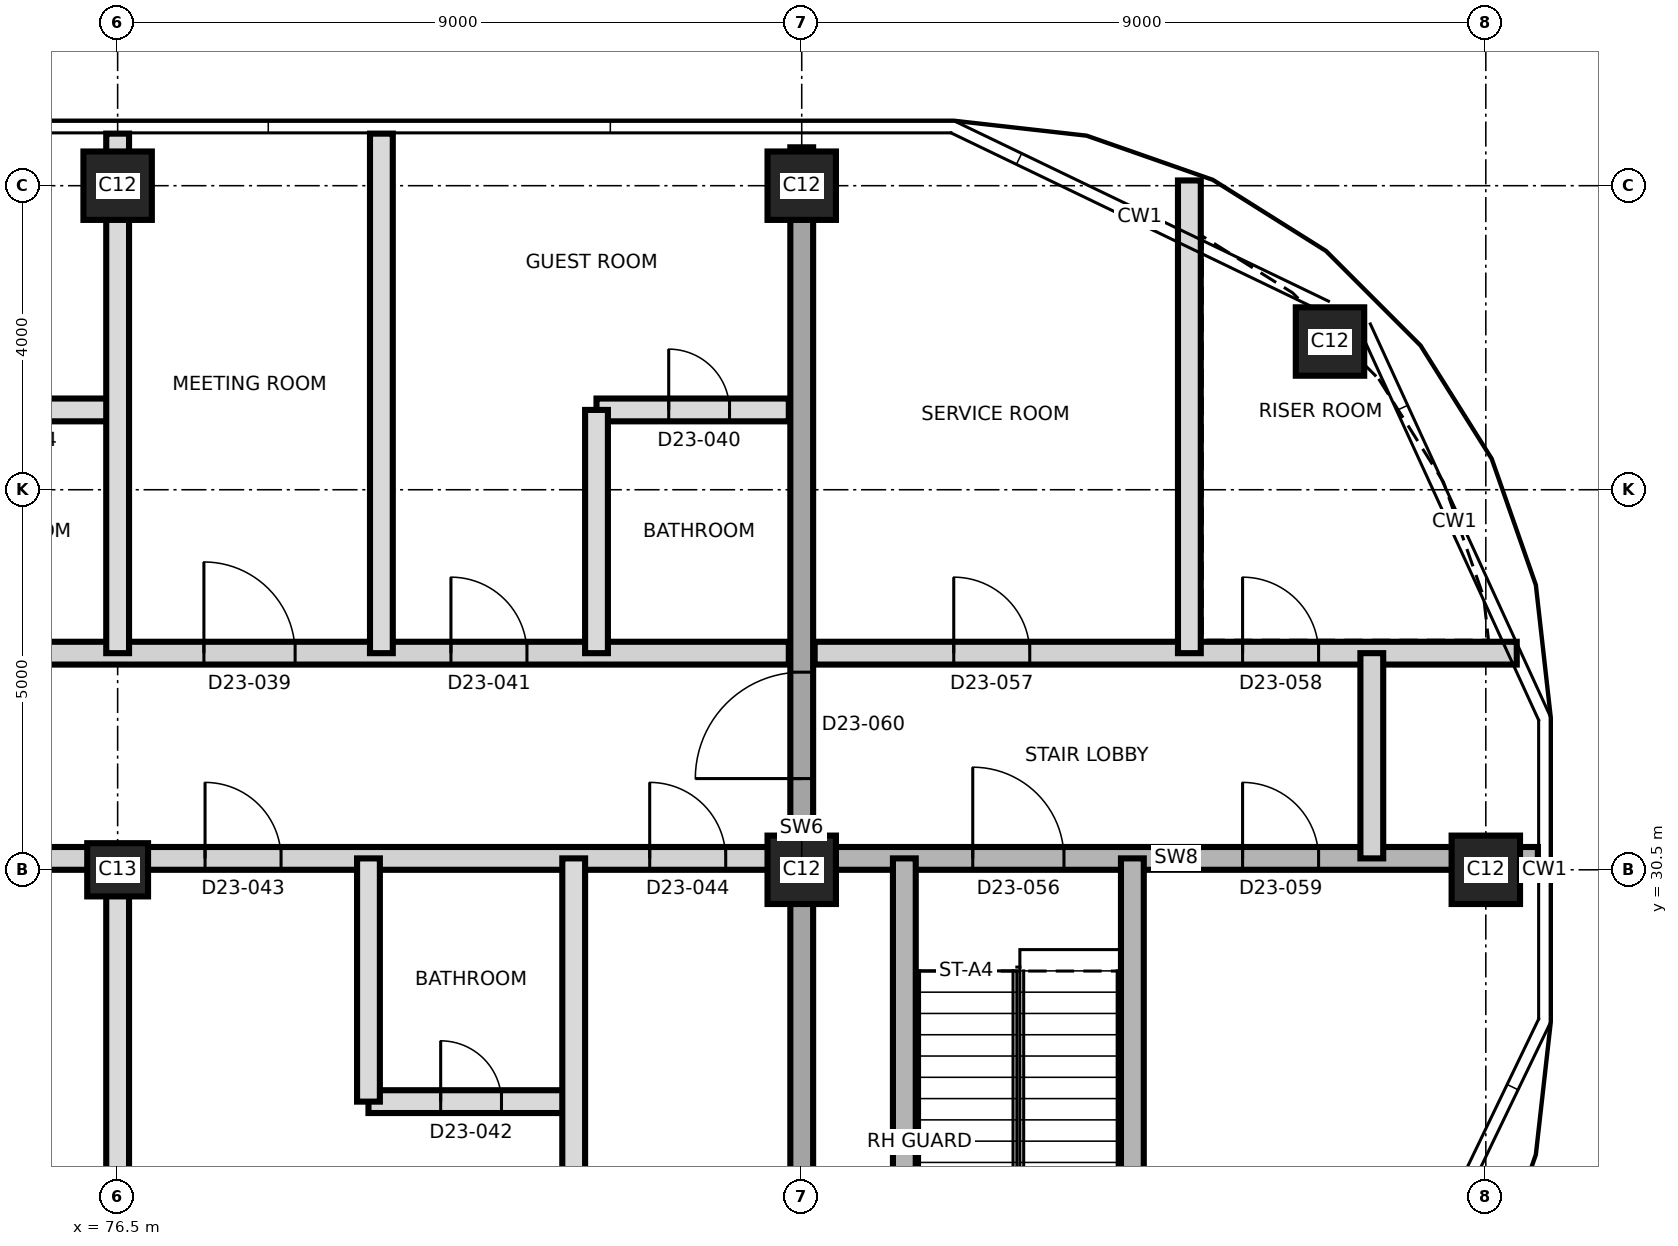
"""IFC4 building model, lengths in metres.
Left out: names, types, materials, properties, quantities, classifications, styles, units other than length and angle.
Written with IfcOpenShell. Run it as: python <this file> out.ifc"""

import sys

from ifc_helpers import new_model, si_unit, direction, frame, frame_2d, origin, origin_2d, place, context, subcontext, project, spatial, rectangle, extrude, element, fill, save


model = new_model("IFC4")
c1 = context("Model", 3, precision=1e-05, world=origin(), true_north=direction((0.0, 1.0)))
c2 = subcontext(c1, "Body", "Model", "MODEL_VIEW")
j1 = project(units=[si_unit("LENGTHUNIT", "METRE"), si_unit("PLANEANGLEUNIT", "RADIAN")], contexts=[c1])
p1 = place(None, origin())
s1 = spatial("IfcSite", under=j1, at=p1, CompositionType="ELEMENT")
p2 = place(p1, origin())
s2 = spatial("IfcBuilding", under=s1, at=p2, CompositionType="ELEMENT")
p3 = place(p2, frame((0.0, 0.0, 210.6)))
s3 = spatial("IfcBuildingStorey", under=s2, at=p3, CompositionType="ELEMENT", Elevation=210.6)
p4 = place(p3, frame((76.5, 30.5, 0.0), z_axis=(0.0, 0.0, 1.0), x_axis=(1.0, 0.0, 0.0)))
e1 = element("IfcColumn", 1, at=p4, inside=s3, PredefinedType="COLUMN", context=c2, shape_type="SweptSolid", body=[
    extrude(rectangle(XDim=0.8, YDim=0.7, at=origin_2d()), origin(), (0.0, 0.0, 1.0), 3.7),
])
for number, where, z_axis, x_axis in (
    (2, (85.5, 30.5, 0.0), (0.0, 0.0, 1.0), (1.0, 0.0, 0.0)),
    (3, (94.5, 30.5, 0.0), (0.0, 0.0, 1.0), (1.0, 0.0, 0.0)),
    (4, (92.45, 37.45, 0.0), (0.0, 0.0, 1.0), (1.0, 0.0, 0.0)),
    (5, (76.5, 39.5, 0.0), (0.0, 0.0, 1.0), (1.0, 0.0, 0.0)),
    (6, (85.5, 39.5, 0.0), (0.0, 0.0, 1.0), (1.0, 0.0, 0.0)),
):
    element("IfcColumn", number, at=place(p3, frame(where, z_axis=z_axis, x_axis=x_axis)), inside=s3, PredefinedType="COLUMN", context=c2, shape_type="SweptSolid", body=[
        extrude(rectangle(XDim=0.9, YDim=0.9, at=origin_2d()), origin(), (0.0, 0.0, 1.0), 3.7),
    ])
p5 = place(p3, frame((85.5, 20.995, 0.0), z_axis=(0.0, 0.0, 1.0), x_axis=(0.0, 1.0, 0.0)))
e7 = element("IfcWall", 7, at=p5, inside=s3, PredefinedType="SHEAR", context=c2, shape_type="SweptSolid", body=[
    extrude(rectangle(XDim=19.01, YDim=0.3, at=frame_2d((9.505, 0.0))), origin(), (0.0, 0.0, 1.0), 3.7),
])
p6 = place(p5, frame((10.705, 0.0, 0.0)))
e8 = element("IfcOpeningElement", 8, at=p6, cuts=e7, PredefinedType="OPENING", context=c2, shape_type="SweptSolid", body=[
    extrude(rectangle(XDim=1.4, YDim=2.1, at=frame_2d((0.7, 1.05))), frame((0.0, 0.16, 0.0), z_axis=(0.0, -1.0, 0.0), x_axis=(1.0, 0.0, 0.0)), (0.0, 0.0, 1.0), 0.32),
])
p7 = place(p3, frame((79.8, 27.45, 0.0), z_axis=(0.0, 0.0, 1.0), x_axis=(1.0, 0.0, 0.0)))
e9 = element("IfcWall", 9, at=p7, inside=s3, PredefinedType="PARTITIONING", context=c2, shape_type="SweptSolid", body=[
    extrude(rectangle(XDim=2.7, YDim=0.3, at=frame_2d((1.35, 0.0))), origin(), (0.0, 0.0, 1.0), 3.4),
])
p8 = place(p7, frame((0.95, 0.0, 0.0)))
e10 = element("IfcOpeningElement", 10, at=p8, cuts=e9, PredefinedType="OPENING", context=c2, shape_type="SweptSolid", body=[
    extrude(rectangle(XDim=0.8, YDim=2.1, at=frame_2d((0.4, 1.05))), frame((0.0, 0.16, 0.0), z_axis=(0.0, -1.0, 0.0), x_axis=(1.0, 0.0, 0.0)), (0.0, 0.0, 1.0), 0.32),
])
p9 = place(p3, frame((58.55, 30.65, 0.0), z_axis=(0.0, 0.0, 1.0), x_axis=(1.0, 0.0, 0.0)))
e11 = element("IfcWall", 11, at=p9, inside=s3, PredefinedType="PARTITIONING", context=c2, shape_type="SweptSolid", body=[
    extrude(rectangle(XDim=26.78, YDim=0.3, at=frame_2d((13.39, 0.0))), origin(), (0.0, 0.0, 1.0), 3.4),
])
p10 = place(p9, frame((3.365, 0.0, 0.0)))
e12 = element("IfcOpeningElement", 12, at=p10, cuts=e11, PredefinedType="OPENING", context=c2, shape_type="SweptSolid", body=[
    extrude(rectangle(XDim=1.0, YDim=2.1, at=frame_2d((0.5, 1.05))), frame((0.0, 0.16, 0.0), z_axis=(0.0, -1.0, 0.0), x_axis=(1.0, 0.0, 0.0)), (0.0, 0.0, 1.0), 0.32),
])
p11 = place(p9, frame((6.315, 0.0, 0.0)))
e13 = element("IfcOpeningElement", 13, at=p11, cuts=e11, PredefinedType="OPENING", context=c2, shape_type="SweptSolid", body=[
    extrude(rectangle(XDim=1.4, YDim=2.1, at=frame_2d((0.7, 1.05))), frame((0.0, 0.16, 0.0), z_axis=(0.0, -1.0, 0.0), x_axis=(1.0, 0.0, 0.0)), (0.0, 0.0, 1.0), 0.32),
])
p12 = place(p9, frame((10.1, 0.0, 0.0)))
e14 = element("IfcOpeningElement", 14, at=p12, cuts=e11, PredefinedType="OPENING", context=c2, shape_type="SweptSolid", body=[
    extrude(rectangle(XDim=1.0, YDim=2.1, at=frame_2d((0.5, 1.05))), frame((0.0, 0.16, 0.0), z_axis=(0.0, -1.0, 0.0), x_axis=(1.0, 0.0, 0.0)), (0.0, 0.0, 1.0), 0.32),
])
p13 = place(p9, frame((15.95, 0.0, 0.0)))
e15 = element("IfcOpeningElement", 15, at=p13, cuts=e11, PredefinedType="OPENING", context=c2, shape_type="SweptSolid", body=[
    extrude(rectangle(XDim=1.0, YDim=2.1, at=frame_2d((0.5, 1.05))), frame((0.0, 0.16, 0.0), z_axis=(0.0, -1.0, 0.0), x_axis=(1.0, 0.0, 0.0)), (0.0, 0.0, 1.0), 0.32),
])
p14 = place(p9, frame((19.1, 0.0, 0.0)))
e16 = element("IfcOpeningElement", 16, at=p14, cuts=e11, PredefinedType="OPENING", context=c2, shape_type="SweptSolid", body=[
    extrude(rectangle(XDim=1.0, YDim=2.1, at=frame_2d((0.5, 1.05))), frame((0.0, 0.16, 0.0), z_axis=(0.0, -1.0, 0.0), x_axis=(1.0, 0.0, 0.0)), (0.0, 0.0, 1.0), 0.32),
])
p15 = place(p9, frame((24.95, 0.0, 0.0)))
e17 = element("IfcOpeningElement", 17, at=p15, cuts=e11, PredefinedType="OPENING", context=c2, shape_type="SweptSolid", body=[
    extrude(rectangle(XDim=1.0, YDim=2.1, at=frame_2d((0.5, 1.05))), frame((0.0, 0.16, 0.0), z_axis=(0.0, -1.0, 0.0), x_axis=(1.0, 0.0, 0.0)), (0.0, 0.0, 1.0), 0.32),
])
p16 = place(p3, frame((85.67, 30.65, 0.0), z_axis=(0.0, 0.0, 1.0), x_axis=(1.0, 0.0, 0.0)))
e18 = element("IfcWall", 18, at=p16, inside=s3, PredefinedType="SHEAR", context=c2, shape_type="SweptSolid", body=[
    extrude(rectangle(XDim=9.515, YDim=0.3, at=frame_2d((4.758, 0.0))), origin(), (0.0, 0.0, 1.0), 3.4),
])
p17 = place(p16, frame((2.08, 0.0, 0.0)))
e19 = element("IfcOpeningElement", 19, at=p17, cuts=e18, PredefinedType="OPENING", context=c2, shape_type="SweptSolid", body=[
    extrude(rectangle(XDim=1.2, YDim=2.1, at=frame_2d((0.6, 1.05))), frame((0.0, 0.16, 0.0), z_axis=(0.0, -1.0, 0.0), x_axis=(1.0, 0.0, 0.0)), (0.0, 0.0, 1.0), 0.32),
])
p18 = place(p16, frame((5.63, 0.0, 0.0)))
e20 = element("IfcOpeningElement", 20, at=p18, cuts=e18, PredefinedType="OPENING", context=c2, shape_type="SweptSolid", body=[
    extrude(rectangle(XDim=1.0, YDim=2.1, at=frame_2d((0.5, 1.05))), frame((0.0, 0.16, 0.0), z_axis=(0.0, -1.0, 0.0), x_axis=(1.0, 0.0, 0.0)), (0.0, 0.0, 1.0), 0.32),
])
p19 = place(p3, frame((58.55, 33.35, 0.0), z_axis=(0.0, 0.0, 1.0), x_axis=(1.0, 0.0, 0.0)))
e21 = element("IfcWall", 21, at=p19, inside=s3, PredefinedType="PARTITIONING", context=c2, shape_type="SweptSolid", body=[
    extrude(rectangle(XDim=26.78, YDim=0.3, at=frame_2d((13.39, 0.0))), origin(), (0.0, 0.0, 1.0), 3.4),
])
p20 = place(p19, frame((3.365, 0.0, 0.0)))
e22 = element("IfcOpeningElement", 22, at=p20, cuts=e21, PredefinedType="OPENING", context=c2, shape_type="SweptSolid", body=[
    extrude(rectangle(XDim=1.0, YDim=2.1, at=frame_2d((0.5, 1.05))), frame((0.0, 0.16, 0.0), z_axis=(0.0, -1.0, 0.0), x_axis=(1.0, 0.0, 0.0)), (0.0, 0.0, 1.0), 0.32),
])
p21 = place(p19, frame((6.315, 0.0, 0.0)))
e23 = element("IfcOpeningElement", 23, at=p21, cuts=e21, PredefinedType="OPENING", context=c2, shape_type="SweptSolid", body=[
    extrude(rectangle(XDim=1.4, YDim=2.1, at=frame_2d((0.7, 1.05))), frame((0.0, 0.16, 0.0), z_axis=(0.0, -1.0, 0.0), x_axis=(1.0, 0.0, 0.0)), (0.0, 0.0, 1.0), 0.32),
])
p22 = place(p19, frame((10.65, 0.0, 0.0)))
e24 = element("IfcOpeningElement", 24, at=p22, cuts=e21, PredefinedType="OPENING", context=c2, shape_type="SweptSolid", body=[
    extrude(rectangle(XDim=1.2, YDim=2.1, at=frame_2d((0.6, 1.05))), frame((0.0, 0.16, 0.0), z_axis=(0.0, -1.0, 0.0), x_axis=(1.0, 0.0, 0.0)), (0.0, 0.0, 1.0), 0.32),
])
p23 = place(p19, frame((13.9, 0.0, 0.0)))
e25 = element("IfcOpeningElement", 25, at=p23, cuts=e21, PredefinedType="OPENING", context=c2, shape_type="SweptSolid", body=[
    extrude(rectangle(XDim=1.0, YDim=2.1, at=frame_2d((0.5, 1.05))), frame((0.0, 0.16, 0.0), z_axis=(0.0, -1.0, 0.0), x_axis=(1.0, 0.0, 0.0)), (0.0, 0.0, 1.0), 0.32),
])
p24 = place(p19, frame((19.085, 0.0, 0.0)))
e26 = element("IfcOpeningElement", 26, at=p24, cuts=e21, PredefinedType="OPENING", context=c2, shape_type="SweptSolid", body=[
    extrude(rectangle(XDim=1.2, YDim=2.1, at=frame_2d((0.6, 1.05))), frame((0.0, 0.16, 0.0), z_axis=(0.0, -1.0, 0.0), x_axis=(1.0, 0.0, 0.0)), (0.0, 0.0, 1.0), 0.32),
])
p25 = place(p19, frame((22.335, 0.0, 0.0)))
e27 = element("IfcOpeningElement", 27, at=p25, cuts=e21, PredefinedType="OPENING", context=c2, shape_type="SweptSolid", body=[
    extrude(rectangle(XDim=1.0, YDim=2.1, at=frame_2d((0.5, 1.05))), frame((0.0, 0.16, 0.0), z_axis=(0.0, -1.0, 0.0), x_axis=(1.0, 0.0, 0.0)), (0.0, 0.0, 1.0), 0.32),
])
p26 = place(p3, frame((85.67, 33.35, 0.0), z_axis=(0.0, 0.0, 1.0), x_axis=(1.0, 0.0, 0.0)))
e28 = element("IfcWall", 28, at=p26, inside=s3, PredefinedType="PARTITIONING", context=c2, shape_type="SweptSolid", body=[
    extrude(rectangle(XDim=9.237, YDim=0.3, at=frame_2d((4.619, 0.0))), origin(), (0.0, 0.0, 1.0), 3.35),
])
p27 = place(p26, frame((1.83, 0.0, 0.0)))
e29 = element("IfcOpeningElement", 29, at=p27, cuts=e28, PredefinedType="OPENING", context=c2, shape_type="SweptSolid", body=[
    extrude(rectangle(XDim=1.0, YDim=2.1, at=frame_2d((0.5, 1.05))), frame((0.0, 0.16, 0.0), z_axis=(0.0, -1.0, 0.0), x_axis=(1.0, 0.0, 0.0)), (0.0, 0.0, 1.0), 0.32),
])
p28 = place(p26, frame((5.63, 0.0, 0.0)))
e30 = element("IfcOpeningElement", 30, at=p28, cuts=e28, PredefinedType="OPENING", context=c2, shape_type="SweptSolid", body=[
    extrude(rectangle(XDim=1.0, YDim=2.1, at=frame_2d((0.5, 1.05))), frame((0.0, 0.16, 0.0), z_axis=(0.0, -1.0, 0.0), x_axis=(1.0, 0.0, 0.0)), (0.0, 0.0, 1.0), 0.32),
])
p29 = place(p3, frame((73.8, 36.55, 0.0), z_axis=(0.0, 0.0, 1.0), x_axis=(1.0, 0.0, 0.0)))
e31 = element("IfcWall", 31, at=p29, inside=s3, PredefinedType="PARTITIONING", context=c2, shape_type="SweptSolid", body=[
    extrude(rectangle(XDim=2.7, YDim=0.3, at=frame_2d((1.35, 0.0))), origin(), (0.0, 0.0, 1.0), 3.4),
])
p30 = place(p29, frame((0.95, 0.0, 0.0)))
e32 = element("IfcOpeningElement", 32, at=p30, cuts=e31, PredefinedType="OPENING", context=c2, shape_type="SweptSolid", body=[
    extrude(rectangle(XDim=0.8, YDim=2.1, at=frame_2d((0.4, 1.05))), frame((0.0, 0.16, 0.0), z_axis=(0.0, -1.0, 0.0), x_axis=(1.0, 0.0, 0.0)), (0.0, 0.0, 1.0), 0.32),
])
p31 = place(p3, frame((82.8, 36.55, 0.0), z_axis=(0.0, 0.0, 1.0), x_axis=(1.0, 0.0, 0.0)))
e33 = element("IfcWall", 33, at=p31, inside=s3, PredefinedType="PARTITIONING", context=c2, shape_type="SweptSolid", body=[
    extrude(rectangle(XDim=2.53, YDim=0.3, at=frame_2d((1.265, 0.0))), origin(), (0.0, 0.0, 1.0), 3.4),
])
p32 = place(p31, frame((0.95, 0.0, 0.0)))
e34 = element("IfcOpeningElement", 34, at=p32, cuts=e33, PredefinedType="OPENING", context=c2, shape_type="SweptSolid", body=[
    extrude(rectangle(XDim=0.8, YDim=2.1, at=frame_2d((0.4, 1.05))), frame((0.0, 0.16, 0.0), z_axis=(0.0, -1.0, 0.0), x_axis=(1.0, 0.0, 0.0)), (0.0, 0.0, 1.0), 0.32),
])
p33 = place(p3, frame((76.5, 20.995, 0.0), z_axis=(0.0, 0.0, 1.0), x_axis=(0.0, 1.0, 0.0)))
e35 = element("IfcWall", 35, at=p33, inside=s3, PredefinedType="PARTITIONING", context=c2, shape_type="SweptSolid", body=[
    extrude(rectangle(XDim=9.655, YDim=0.3, at=frame_2d((4.827, 0.0))), origin(), (0.0, 0.0, 1.0), 3.35),
])
p34 = place(p3, frame((76.5, 33.35, 0.0), z_axis=(0.0, 0.0, 1.0), x_axis=(0.0, 1.0, 0.0)))
e36 = element("IfcWall", 36, at=p34, inside=s3, PredefinedType="PARTITIONING", context=c2, shape_type="SweptSolid", body=[
    extrude(rectangle(XDim=6.835, YDim=0.3, at=frame_2d((3.417, 0.0))), origin(), (0.0, 0.0, 1.0), 3.35),
])
p35 = place(p3, frame((79.8, 27.45, 0.0), z_axis=(0.0, 0.0, 1.0), x_axis=(0.0, 1.0, 0.0)))
e37 = element("IfcWall", 37, at=p35, inside=s3, PredefinedType="PARTITIONING", context=c2, shape_type="SweptSolid", body=[
    extrude(rectangle(XDim=3.2, YDim=0.3, at=frame_2d((1.6, 0.0))), origin(), (0.0, 0.0, 1.0), 3.4),
])
p36 = place(p3, frame((79.97, 33.35, 0.0), z_axis=(0.0, 0.0, 1.0), x_axis=(0.0, 1.0, 0.0)))
e38 = element("IfcWall", 38, at=p36, inside=s3, PredefinedType="PARTITIONING", context=c2, shape_type="SweptSolid", body=[
    extrude(rectangle(XDim=6.835, YDim=0.3, at=frame_2d((3.417, 0.0))), origin(), (0.0, 0.0, 1.0), 3.35),
])
p37 = place(p3, frame((82.5, 20.995, 0.0), z_axis=(0.0, 0.0, 1.0), x_axis=(0.0, 1.0, 0.0)))
e39 = element("IfcWall", 39, at=p37, inside=s3, PredefinedType="PARTITIONING", context=c2, shape_type="SweptSolid", body=[
    extrude(rectangle(XDim=9.655, YDim=0.3, at=frame_2d((4.827, 0.0))), origin(), (0.0, 0.0, 1.0), 3.35),
])
p38 = place(p3, frame((82.8, 33.35, 0.0), z_axis=(0.0, 0.0, 1.0), x_axis=(0.0, 1.0, 0.0)))
e40 = element("IfcWall", 40, at=p38, inside=s3, PredefinedType="PARTITIONING", context=c2, shape_type="SweptSolid", body=[
    extrude(rectangle(XDim=3.2, YDim=0.3, at=frame_2d((1.6, 0.0))), origin(), (0.0, 0.0, 1.0), 3.4),
])
for number, where, z_axis, x_axis in (
    (41, (86.85, 21.8, 0.0), (0.0, 0.0, 1.0), (0.0, 1.0, 0.0)),
    (42, (89.85, 21.8, 0.0), (0.0, 0.0, 1.0), (0.0, 1.0, 0.0)),
):
    element("IfcWall", number, at=place(p3, frame(where, z_axis=z_axis, x_axis=x_axis)), inside=s3, PredefinedType="SHEAR", context=c2, shape_type="SweptSolid", body=[
        extrude(rectangle(XDim=8.85, YDim=0.3, at=frame_2d((4.425, 0.0))), origin(), (0.0, 0.0, 1.0), 3.4),
    ])
p39 = place(p3, frame((90.6, 33.35, 0.0), z_axis=(0.0, 0.0, 1.0), x_axis=(0.0, 1.0, 0.0)))
e43 = element("IfcWall", 43, at=p39, inside=s3, PredefinedType="PARTITIONING", context=c2, shape_type="SweptSolid", body=[
    extrude(rectangle(XDim=6.219, YDim=0.3, at=frame_2d((3.109, 0.0))), origin(), (0.0, 0.0, 1.0), 3.35),
])
p40 = place(p3, frame((93.0, 30.65, 0.0), z_axis=(0.0, 0.0, 1.0), x_axis=(0.0, 1.0, 0.0)))
e44 = element("IfcWall", 44, at=p40, inside=s3, PredefinedType="PARTITIONING", context=c2, shape_type="SweptSolid", body=[
    extrude(rectangle(XDim=2.7, YDim=0.3, at=frame_2d((1.35, 0.0))), origin(), (0.0, 0.0, 1.0), 3.4),
])
p41 = place(p24, origin())
e45 = element("IfcDoor", 45, at=p41, inside=s3, OperationType="SINGLE_SWING_LEFT", PredefinedType="DOOR", context=c2, shape_type="SweptSolid", body=[
    extrude(rectangle(XDim=1.2, YDim=2.1, at=frame_2d((0.6, 1.05))), frame((0.0, 0.025, 0.0), z_axis=(0.0, -1.0, 0.0), x_axis=(1.0, 0.0, 0.0)), (0.0, 0.0, 1.0), 0.05),
])
fill(e26, e45)
p42 = place(p32, origin())
e46 = element("IfcDoor", 46, at=p42, inside=s3, OperationType="SINGLE_SWING_RIGHT", PredefinedType="DOOR", context=c2, shape_type="SweptSolid", body=[
    extrude(rectangle(XDim=0.8, YDim=2.1, at=frame_2d((0.4, 1.05))), frame((0.0, 0.025, 0.0), z_axis=(0.0, -1.0, 0.0), x_axis=(1.0, 0.0, 0.0)), (0.0, 0.0, 1.0), 0.05),
])
fill(e34, e46)
p43 = place(p25, origin())
e47 = element("IfcDoor", 47, at=p43, inside=s3, OperationType="SINGLE_SWING_LEFT", PredefinedType="DOOR", context=c2, shape_type="SweptSolid", body=[
    extrude(rectangle(XDim=1.0, YDim=2.1, at=frame_2d((0.5, 1.05))), frame((0.0, 0.025, 0.0), z_axis=(0.0, -1.0, 0.0), x_axis=(1.0, 0.0, 0.0)), (0.0, 0.0, 1.0), 0.05),
])
fill(e27, e47)
p44 = place(p8, origin())
e48 = element("IfcDoor", 48, at=p44, inside=s3, OperationType="SINGLE_SWING_LEFT", PredefinedType="DOOR", context=c2, shape_type="SweptSolid", body=[
    extrude(rectangle(XDim=0.8, YDim=2.1, at=frame_2d((0.4, 1.05))), frame((0.0, 0.025, 0.0), z_axis=(0.0, -1.0, 0.0), x_axis=(1.0, 0.0, 0.0)), (0.0, 0.0, 1.0), 0.05),
])
fill(e10, e48)
p45 = place(p14, origin())
e49 = element("IfcDoor", 49, at=p45, inside=s3, OperationType="SINGLE_SWING_LEFT", PredefinedType="DOOR", context=c2, shape_type="SweptSolid", body=[
    extrude(rectangle(XDim=1.0, YDim=2.1, at=frame_2d((0.5, 1.05))), frame((0.0, 0.025, 0.0), z_axis=(0.0, -1.0, 0.0), x_axis=(1.0, 0.0, 0.0)), (0.0, 0.0, 1.0), 0.05),
])
fill(e16, e49)
p46 = place(p15, origin())
e50 = element("IfcDoor", 50, at=p46, inside=s3, OperationType="SINGLE_SWING_RIGHT", PredefinedType="DOOR", context=c2, shape_type="SweptSolid", body=[
    extrude(rectangle(XDim=1.0, YDim=2.1, at=frame_2d((0.5, 1.05))), frame((0.0, 0.025, 0.0), z_axis=(0.0, -1.0, 0.0), x_axis=(1.0, 0.0, 0.0)), (0.0, 0.0, 1.0), 0.05),
])
fill(e17, e50)
p47 = place(p17, origin())
e51 = element("IfcDoor", 51, at=p47, inside=s3, OperationType="SINGLE_SWING_LEFT", PredefinedType="DOOR", context=c2, shape_type="SweptSolid", body=[
    extrude(rectangle(XDim=1.2, YDim=2.1, at=frame_2d((0.6, 1.05))), frame((0.0, 0.025, 0.0), z_axis=(0.0, -1.0, 0.0), x_axis=(1.0, 0.0, 0.0)), (0.0, 0.0, 1.0), 0.05),
])
fill(e19, e51)
p48 = place(p27, origin())
e52 = element("IfcDoor", 52, at=p48, inside=s3, OperationType="SINGLE_SWING_LEFT", PredefinedType="DOOR", context=c2, shape_type="SweptSolid", body=[
    extrude(rectangle(XDim=1.0, YDim=2.1, at=frame_2d((0.5, 1.05))), frame((0.0, 0.025, 0.0), z_axis=(0.0, -1.0, 0.0), x_axis=(1.0, 0.0, 0.0)), (0.0, 0.0, 1.0), 0.05),
])
fill(e29, e52)
p49 = place(p28, origin())
e53 = element("IfcDoor", 53, at=p49, inside=s3, OperationType="SINGLE_SWING_RIGHT", PredefinedType="DOOR", context=c2, shape_type="SweptSolid", body=[
    extrude(rectangle(XDim=1.0, YDim=2.1, at=frame_2d((0.5, 1.05))), frame((0.0, 0.025, 0.0), z_axis=(0.0, -1.0, 0.0), x_axis=(1.0, 0.0, 0.0)), (0.0, 0.0, 1.0), 0.05),
])
fill(e30, e53)
p50 = place(p18, origin())
e54 = element("IfcDoor", 54, at=p50, inside=s3, OperationType="SINGLE_SWING_LEFT", PredefinedType="DOOR", context=c2, shape_type="SweptSolid", body=[
    extrude(rectangle(XDim=1.0, YDim=2.1, at=frame_2d((0.5, 1.05))), frame((0.0, 0.025, 0.0), z_axis=(0.0, -1.0, 0.0), x_axis=(1.0, 0.0, 0.0)), (0.0, 0.0, 1.0), 0.05),
])
fill(e20, e54)
p51 = place(p6, origin())
e55 = element("IfcDoor", 55, at=p51, inside=s3, OperationType="SINGLE_SWING_RIGHT", PredefinedType="DOOR", context=c2, shape_type="SweptSolid", body=[
    extrude(rectangle(XDim=1.4, YDim=2.1, at=frame_2d((0.7, 1.05))), frame((0.0, 0.025, 0.0), z_axis=(0.0, -1.0, 0.0), x_axis=(1.0, 0.0, 0.0)), (0.0, 0.0, 1.0), 0.05),
])
fill(e8, e55)
save(model, sys.argv[1])
